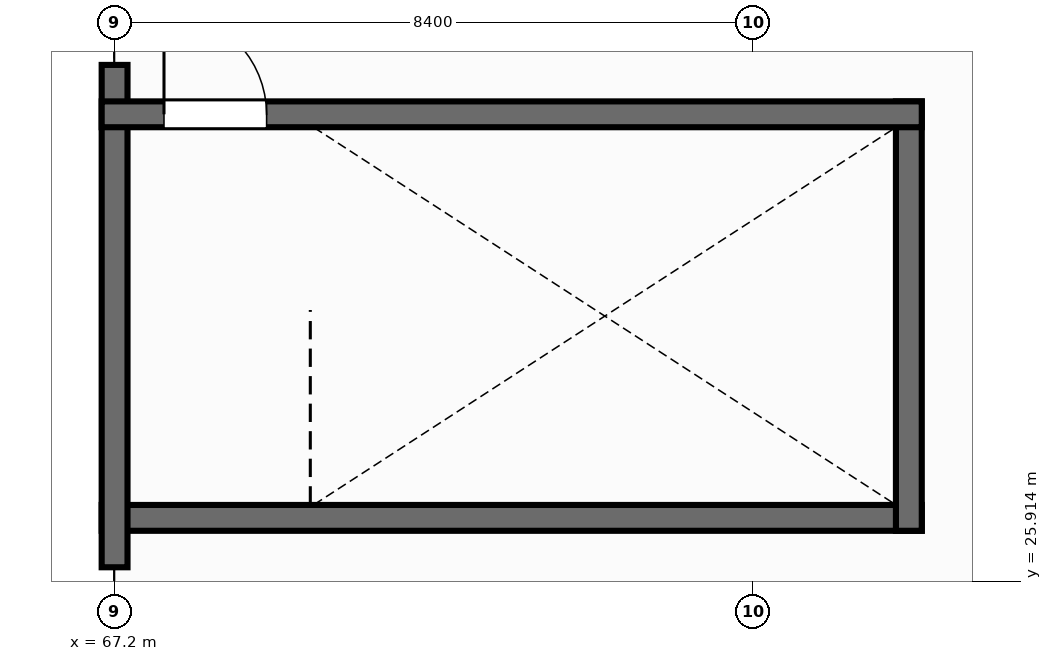
"""IFC4 building model, lengths in metres.
Left out: names, types, materials, properties, quantities, classifications, styles, units other than length and angle.
Written with IfcOpenShell. Run it as: python <this file> out.ifc"""

import sys

from ifc_helpers import new_model, si_unit, direction, frame, frame_2d, origin, place, context, subcontext, project, spatial, rectangle, extrude, element, fill, save


model = new_model("IFC4")
c1 = context("Model", 3, precision=1e-05, world=origin(), true_north=direction((0.0, 1.0)))
c2 = subcontext(c1, "Body", "Model", "MODEL_VIEW")
j1 = project(units=[si_unit("LENGTHUNIT", "METRE"), si_unit("PLANEANGLEUNIT", "RADIAN")], contexts=[c1])
p1 = place(None, origin())
s1 = spatial("IfcSite", under=j1, at=p1, CompositionType="ELEMENT")
p2 = place(p1, origin())
s2 = spatial("IfcBuilding", under=s1, at=p2, CompositionType="ELEMENT")
p3 = place(p2, frame((0.0, 0.0, 9.9)))
s3 = spatial("IfcBuildingStorey", under=s2, at=p3, CompositionType="ELEMENT", Elevation=9.9)
p4 = place(p3, frame((67.035, 26.745, 0.0), z_axis=(0.0, 0.0, 1.0), x_axis=(1.0, 0.0, 0.0)))
e1 = element("IfcWall", 1, at=p4, inside=s3, PredefinedType="SHEAR", context=c2, shape_type="SweptSolid", body=[
    extrude(rectangle(XDim=10.79, YDim=0.34, at=frame_2d((5.395, 0.0))), origin(), (0.0, 0.0, 1.0), 3.84),
])
p5 = place(p3, frame((67.205, 26.095, 0.0), z_axis=(0.0, 0.0, 1.0), x_axis=(0.0, 1.0, 0.0)))
e2 = element("IfcWall", 2, at=p5, inside=s3, PredefinedType="SHEAR", context=c2, shape_type="SweptSolid", body=[
    extrude(rectangle(XDim=6.61, YDim=0.34, at=frame_2d((3.305, 0.0))), origin(), (0.0, 0.0, 1.0), 3.84),
])
p6 = place(p3, frame((77.655, 26.575, 0.0), z_axis=(0.0, 0.0, 1.0), x_axis=(0.0, 1.0, 0.0)))
e3 = element("IfcWall", 3, at=p6, inside=s3, PredefinedType="SHEAR", context=c2, shape_type="SweptSolid", body=[
    extrude(rectangle(XDim=5.65, YDim=0.34, at=frame_2d((2.825, 0.0))), origin(), (0.0, 0.0, 1.0), 3.84),
])
p7 = place(p3, frame((67.035, 32.055, 0.0), z_axis=(0.0, 0.0, 1.0), x_axis=(1.0, 0.0, 0.0)))
e4 = element("IfcWall", 4, at=p7, inside=s3, PredefinedType="SHEAR", context=c2, shape_type="SweptSolid", body=[
    extrude(rectangle(XDim=10.79, YDim=0.34, at=frame_2d((5.395, 0.0))), origin(), (0.0, 0.0, 1.0), 3.84),
])
p8 = place(p7, frame((0.82, 0.0, 0.0)))
e5 = element("IfcOpeningElement", 5, at=p8, cuts=e4, PredefinedType="OPENING", context=c2, shape_type="SweptSolid", body=[
    extrude(rectangle(XDim=1.35, YDim=2.2, at=frame_2d((0.675, 1.1))), frame((0.0, 0.18, 0.0), z_axis=(0.0, -1.0, 0.0), x_axis=(1.0, 0.0, 0.0)), (0.0, 0.0, 1.0), 0.36),
])
p9 = place(p8, origin())
e6 = element("IfcDoor", 6, at=p9, inside=s3, OperationType="SINGLE_SWING_LEFT", PredefinedType="DOOR", context=c2, shape_type="SweptSolid", body=[
    extrude(rectangle(XDim=1.35, YDim=2.2, at=frame_2d((0.675, 1.1))), frame((0.0, 0.025, 0.0), z_axis=(0.0, -1.0, 0.0), x_axis=(1.0, 0.0, 0.0)), (0.0, 0.0, 1.0), 0.05),
])
fill(e5, e6)
save(model, sys.argv[1])
